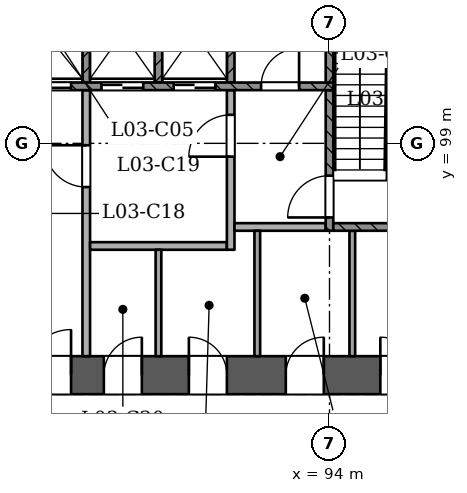
"""IFC4 building model, lengths in metres.
Left out: names, types, materials, properties, quantities, classifications, styles, units other than length and angle.
Written with IfcOpenShell. Run it as: python <this file> out.ifc"""

import sys

from ifc_helpers import new_model, si_unit, direction, frame, frame_2d, origin, place, context, subcontext, project, spatial, rectangle, extrude, element, fill, save


model = new_model("IFC4")
c1 = context("Model", 3, precision=1e-05, world=origin(), true_north=direction((0.0, 1.0)))
c2 = subcontext(c1, "Body", "Model", "MODEL_VIEW")
j1 = project(units=[si_unit("LENGTHUNIT", "METRE"), si_unit("PLANEANGLEUNIT", "RADIAN")], contexts=[c1])
p1 = place(None, origin())
s1 = spatial("IfcSite", under=j1, at=p1, CompositionType="ELEMENT")
p2 = place(p1, origin())
s2 = spatial("IfcBuilding", under=s1, at=p2, CompositionType="ELEMENT")
p3 = place(p2, frame((0.0, 0.0, 18.0)))
s3 = spatial("IfcBuildingStorey", under=s2, at=p3, CompositionType="ELEMENT", Elevation=18.0)
p4 = place(p3, frame((72.5, 92.9, 0.0), z_axis=(0.0, 0.0, 1.0), x_axis=(1.0, 0.0, 0.0)))
e1 = element("IfcWall", 1, at=p4, inside=s3, PredefinedType="SHEAR", context=c2, shape_type="SweptSolid", body=[
    extrude(rectangle(XDim=25.5, YDim=1.0, at=frame_2d((12.75, 0.0))), origin(), (0.0, 0.0, 1.0), 4.5),
])
p5 = place(p4, frame((1.3, 0.0, 0.0)))
e2 = element("IfcOpeningElement", 2, at=p5, cuts=e1, PredefinedType="OPENING", context=c2, shape_type="SweptSolid", body=[
    extrude(rectangle(XDim=1.2, YDim=2.1, at=frame_2d((0.6, 1.05))), frame((0.0, 0.51, 0.0), z_axis=(0.0, -1.0, 0.0), x_axis=(1.0, 0.0, 0.0)), (0.0, 0.0, 1.0), 1.021),
])
p6 = place(p4, frame((3.5, 0.0, 0.0)))
e3 = element("IfcOpeningElement", 3, at=p6, cuts=e1, PredefinedType="OPENING", context=c2, shape_type="SweptSolid", body=[
    extrude(rectangle(XDim=1.2, YDim=2.1, at=frame_2d((0.6, 1.05))), frame((0.0, 0.51, 0.0), z_axis=(0.0, -1.0, 0.0), x_axis=(1.0, 0.0, 0.0)), (0.0, 0.0, 1.0), 1.021),
])
p7 = place(p4, frame((13.5, 0.0, 0.0)))
e4 = element("IfcOpeningElement", 4, at=p7, cuts=e1, PredefinedType="OPENING", context=c2, shape_type="SweptSolid", body=[
    extrude(rectangle(XDim=1.2, YDim=2.1, at=frame_2d((0.6, 1.05))), frame((0.0, 0.51, 0.0), z_axis=(0.0, -1.0, 0.0), x_axis=(1.0, 0.0, 0.0)), (0.0, 0.0, 1.0), 1.021),
])
p8 = place(p4, frame((15.562, 0.0, 0.0)))
e5 = element("IfcOpeningElement", 5, at=p8, cuts=e1, PredefinedType="OPENING", context=c2, shape_type="SweptSolid", body=[
    extrude(rectangle(XDim=1.0, YDim=2.1, at=frame_2d((0.5, 1.05))), frame((0.0, 0.51, 0.0), z_axis=(0.0, -1.0, 0.0), x_axis=(1.0, 0.0, 0.0)), (0.0, 0.0, 1.0), 1.021),
])
p9 = place(p4, frame((17.8, 0.0, 0.0)))
e6 = element("IfcOpeningElement", 6, at=p9, cuts=e1, PredefinedType="OPENING", context=c2, shape_type="SweptSolid", body=[
    extrude(rectangle(XDim=1.0, YDim=2.1, at=frame_2d((0.5, 1.05))), frame((0.0, 0.51, 0.0), z_axis=(0.0, -1.0, 0.0), x_axis=(1.0, 0.0, 0.0)), (0.0, 0.0, 1.0), 1.021),
])
p10 = place(p4, frame((20.35, 0.0, 0.0)))
e7 = element("IfcOpeningElement", 7, at=p10, cuts=e1, PredefinedType="OPENING", context=c2, shape_type="SweptSolid", body=[
    extrude(rectangle(XDim=1.0, YDim=2.1, at=frame_2d((0.5, 1.05))), frame((0.0, 0.51, 0.0), z_axis=(0.0, -1.0, 0.0), x_axis=(1.0, 0.0, 0.0)), (0.0, 0.0, 1.0), 1.021),
])
p11 = place(p4, frame((22.837, 0.0, 0.0)))
e8 = element("IfcOpeningElement", 8, at=p11, cuts=e1, PredefinedType="OPENING", context=c2, shape_type="SweptSolid", body=[
    extrude(rectangle(XDim=1.0, YDim=2.1, at=frame_2d((0.5, 1.05))), frame((0.0, 0.51, 0.0), z_axis=(0.0, -1.0, 0.0), x_axis=(1.0, 0.0, 0.0)), (0.0, 0.0, 1.0), 1.021),
])
p12 = place(p3, frame((86.747, 47.526, 0.0), z_axis=(0.0, 0.0, 1.0), x_axis=(0.500000085768, 0.866025354266, 0.0)))
e9 = element("IfcWall", 9, at=p12, inside=s3, PredefinedType="PARTITIONING", context=c2, shape_type="SweptSolid", body=[
    extrude(rectangle(XDim=55.365, YDim=0.15, at=frame_2d((27.682, 0.0))), origin(), (0.0, 0.0, 1.0), 3.55),
])
p13 = place(p12, frame((0.97, 0.0, 0.0)))
e10 = element("IfcOpeningElement", 10, at=p13, cuts=e9, PredefinedType="OPENING", context=c2, shape_type="SweptSolid", body=[
    extrude(rectangle(XDim=1.2, YDim=2.1, at=frame_2d((0.6, 1.05))), frame((0.0, 0.085, 0.0), z_axis=(0.0, -1.0, 0.0), x_axis=(1.0, 0.0, 0.0)), (0.0, 0.0, 1.0), 0.171),
])
p14 = place(p12, frame((11.332, 0.0, 0.0)))
e11 = element("IfcOpeningElement", 11, at=p14, cuts=e9, PredefinedType="OPENING", context=c2, shape_type="SweptSolid", body=[
    extrude(rectangle(XDim=1.2, YDim=2.1, at=frame_2d((0.6, 1.05))), frame((0.0, 0.085, 0.0), z_axis=(0.0, -1.0, 0.0), x_axis=(1.0, 0.0, 0.0)), (0.0, 0.0, 1.0), 0.171),
])
p15 = place(p12, frame((22.582, 0.0, 0.0)))
e12 = element("IfcOpeningElement", 12, at=p15, cuts=e9, PredefinedType="OPENING", context=c2, shape_type="SweptSolid", body=[
    extrude(rectangle(XDim=1.2, YDim=2.1, at=frame_2d((0.6, 1.05))), frame((0.0, 0.085, 0.0), z_axis=(0.0, -1.0, 0.0), x_axis=(1.0, 0.0, 0.0)), (0.0, 0.0, 1.0), 0.171),
])
p16 = place(p12, frame((28.365, 0.0, 0.0)))
e13 = element("IfcOpeningElement", 13, at=p16, cuts=e9, PredefinedType="OPENING", context=c2, shape_type="SweptSolid", body=[
    extrude(rectangle(XDim=1.0, YDim=2.1, at=frame_2d((0.5, 1.05))), frame((0.0, 0.085, 0.0), z_axis=(0.0, -1.0, 0.0), x_axis=(1.0, 0.0, 0.0)), (0.0, 0.0, 1.0), 0.171),
])
p17 = place(p12, frame((30.615, 0.0, 0.0)))
e14 = element("IfcOpeningElement", 14, at=p17, cuts=e9, PredefinedType="OPENING", context=c2, shape_type="SweptSolid", body=[
    extrude(rectangle(XDim=1.0, YDim=2.1, at=frame_2d((0.5, 1.05))), frame((0.0, 0.085, 0.0), z_axis=(0.0, -1.0, 0.0), x_axis=(1.0, 0.0, 0.0)), (0.0, 0.0, 1.0), 0.171),
])
p18 = place(p12, frame((38.332, 0.0, 0.0)))
e15 = element("IfcOpeningElement", 15, at=p18, cuts=e9, PredefinedType="OPENING", context=c2, shape_type="SweptSolid", body=[
    extrude(rectangle(XDim=1.2, YDim=2.1, at=frame_2d((0.6, 1.05))), frame((0.0, 0.085, 0.0), z_axis=(0.0, -1.0, 0.0), x_axis=(1.0, 0.0, 0.0)), (0.0, 0.0, 1.0), 0.171),
])
p19 = place(p12, frame((49.582, 0.0, 0.0)))
e16 = element("IfcOpeningElement", 16, at=p19, cuts=e9, PredefinedType="OPENING", context=c2, shape_type="SweptSolid", body=[
    extrude(rectangle(XDim=1.2, YDim=2.1, at=frame_2d((0.6, 1.05))), frame((0.0, 0.085, 0.0), z_axis=(0.0, -1.0, 0.0), x_axis=(1.0, 0.0, 0.0)), (0.0, 0.0, 1.0), 0.171),
])
p20 = place(p3, frame((121.762, 95.574, 0.0), z_axis=(0.0, 0.0, 1.0), x_axis=(-0.499997306052, -0.866026959131, 0.0)))
e17 = element("IfcWall", 17, at=p20, inside=s3, PredefinedType="SOLIDWALL", context=c2, shape_type="SweptSolid", body=[
    extrude(rectangle(XDim=62.87, YDim=0.4, at=frame_2d((31.435, 0.0))), origin(), (0.0, 0.0, 1.0), 3.55),
])
p21 = place(p20, frame((59.452, 0.0, 0.9)))
e18 = element("IfcOpeningElement", 18, at=p21, cuts=e17, PredefinedType="OPENING", context=c2, shape_type="SweptSolid", body=[
    extrude(rectangle(XDim=2.4, YDim=1.5, at=frame_2d((1.2, 0.75))), frame((0.0, 0.21, 0.0), z_axis=(0.0, -1.0, 0.0), x_axis=(1.0, 0.0, 0.0)), (0.0, 0.0, 1.0), 0.421),
])
p22 = place(p20, frame((54.986, 0.0, 0.9)))
e19 = element("IfcOpeningElement", 19, at=p22, cuts=e17, PredefinedType="OPENING", context=c2, shape_type="SweptSolid", body=[
    extrude(rectangle(XDim=2.4, YDim=1.5, at=frame_2d((1.2, 0.75))), frame((0.0, 0.21, 0.0), z_axis=(0.0, -1.0, 0.0), x_axis=(1.0, 0.0, 0.0)), (0.0, 0.0, 1.0), 0.421),
])
p23 = place(p20, frame((50.486, 0.0, 0.9)))
e20 = element("IfcOpeningElement", 20, at=p23, cuts=e17, PredefinedType="OPENING", context=c2, shape_type="SweptSolid", body=[
    extrude(rectangle(XDim=2.4, YDim=1.5, at=frame_2d((1.2, 0.75))), frame((0.0, 0.21, 0.0), z_axis=(0.0, -1.0, 0.0), x_axis=(1.0, 0.0, 0.0)), (0.0, 0.0, 1.0), 0.421),
])
p24 = place(p20, frame((45.986, 0.0, 0.9)))
e21 = element("IfcOpeningElement", 21, at=p24, cuts=e17, PredefinedType="OPENING", context=c2, shape_type="SweptSolid", body=[
    extrude(rectangle(XDim=2.4, YDim=1.5, at=frame_2d((1.2, 0.75))), frame((0.0, 0.21, 0.0), z_axis=(0.0, -1.0, 0.0), x_axis=(1.0, 0.0, 0.0)), (0.0, 0.0, 1.0), 0.421),
])
p25 = place(p20, frame((41.486, 0.0, 0.9)))
e22 = element("IfcOpeningElement", 22, at=p25, cuts=e17, PredefinedType="OPENING", context=c2, shape_type="SweptSolid", body=[
    extrude(rectangle(XDim=2.4, YDim=1.5, at=frame_2d((1.2, 0.75))), frame((0.0, 0.21, 0.0), z_axis=(0.0, -1.0, 0.0), x_axis=(1.0, 0.0, 0.0)), (0.0, 0.0, 1.0), 0.421),
])
p26 = place(p20, frame((36.986, 0.0, 0.9)))
e23 = element("IfcOpeningElement", 23, at=p26, cuts=e17, PredefinedType="OPENING", context=c2, shape_type="SweptSolid", body=[
    extrude(rectangle(XDim=2.4, YDim=1.5, at=frame_2d((1.2, 0.75))), frame((0.0, 0.21, 0.0), z_axis=(0.0, -1.0, 0.0), x_axis=(1.0, 0.0, 0.0)), (0.0, 0.0, 1.0), 0.421),
])
p27 = place(p20, frame((23.486, 0.0, 0.9)))
e24 = element("IfcOpeningElement", 24, at=p27, cuts=e17, PredefinedType="OPENING", context=c2, shape_type="SweptSolid", body=[
    extrude(rectangle(XDim=2.4, YDim=1.5, at=frame_2d((1.2, 0.75))), frame((0.0, 0.21, 0.0), z_axis=(0.0, -1.0, 0.0), x_axis=(1.0, 0.0, 0.0)), (0.0, 0.0, 1.0), 0.421),
])
p28 = place(p20, frame((18.986, 0.0, 0.9)))
e25 = element("IfcOpeningElement", 25, at=p28, cuts=e17, PredefinedType="OPENING", context=c2, shape_type="SweptSolid", body=[
    extrude(rectangle(XDim=2.4, YDim=1.5, at=frame_2d((1.2, 0.75))), frame((0.0, 0.21, 0.0), z_axis=(0.0, -1.0, 0.0), x_axis=(1.0, 0.0, 0.0)), (0.0, 0.0, 1.0), 0.421),
])
p29 = place(p20, frame((14.486, 0.0, 0.9)))
e26 = element("IfcOpeningElement", 26, at=p29, cuts=e17, PredefinedType="OPENING", context=c2, shape_type="SweptSolid", body=[
    extrude(rectangle(XDim=2.4, YDim=1.5, at=frame_2d((1.2, 0.75))), frame((0.0, 0.21, 0.0), z_axis=(0.0, -1.0, 0.0), x_axis=(1.0, 0.0, 0.0)), (0.0, 0.0, 1.0), 0.421),
])
p30 = place(p20, frame((5.486, 0.0, 0.9)))
e27 = element("IfcOpeningElement", 27, at=p30, cuts=e17, PredefinedType="OPENING", context=c2, shape_type="SweptSolid", body=[
    extrude(rectangle(XDim=2.4, YDim=1.5, at=frame_2d((1.2, 0.75))), frame((0.0, 0.21, 0.0), z_axis=(0.0, -1.0, 0.0), x_axis=(1.0, 0.0, 0.0)), (0.0, 0.0, 1.0), 0.421),
])
p31 = place(p20, frame((1.018, 0.0, 0.9)))
e28 = element("IfcOpeningElement", 28, at=p31, cuts=e17, PredefinedType="OPENING", context=c2, shape_type="SweptSolid", body=[
    extrude(rectangle(XDim=2.4, YDim=1.5, at=frame_2d((1.2, 0.75))), frame((0.0, 0.21, 0.0), z_axis=(0.0, -1.0, 0.0), x_axis=(1.0, 0.0, 0.0)), (0.0, 0.0, 1.0), 0.421),
])
p32 = place(p3, frame((87.6, 93.4, 0.0), z_axis=(0.0, 0.0, 1.0), x_axis=(0.0, 1.0, 0.0)))
e29 = element("IfcWall", 29, at=p32, inside=s3, PredefinedType="PARTITIONING", context=c2, shape_type="SweptSolid", body=[
    extrude(rectangle(XDim=7.0, YDim=0.2, at=frame_2d((3.5, 0.0))), origin(), (0.0, 0.0, 1.0), 4.05),
])
p33 = place(p32, frame((4.45, 0.0, 0.0)))
e30 = element("IfcOpeningElement", 30, at=p33, cuts=e29, PredefinedType="OPENING", context=c2, shape_type="SweptSolid", body=[
    extrude(rectangle(XDim=1.1, YDim=2.1, at=frame_2d((0.55, 1.05))), frame((0.0, 0.11, 0.0), z_axis=(0.0, -1.0, 0.0), x_axis=(1.0, 0.0, 0.0)), (0.0, 0.0, 1.0), 0.221),
])
p34 = place(p3, frame((89.5, 93.4, 0.0), z_axis=(0.0, 0.0, 1.0), x_axis=(0.0, 1.0, 0.0)))
e31 = element("IfcWall", 31, at=p34, inside=s3, PredefinedType="PARTITIONING", context=c2, shape_type="SweptSolid", body=[
    extrude(rectangle(XDim=2.8, YDim=0.15, at=frame_2d((1.4, 0.0))), origin(), (0.0, 0.0, 1.0), 4.05),
])
for number, where, z_axis, x_axis in (
    (32, (92.1, 93.4, 0.0), (0.0, 0.0, 1.0), (0.0, 1.0, 0.0)),
    (33, (94.6, 93.4, 0.0), (0.0, 0.0, 1.0), (0.0, 1.0, 0.0)),
):
    element("IfcWall", number, at=place(p3, frame(where, z_axis=z_axis, x_axis=x_axis)), inside=s3, PredefinedType="PARTITIONING", context=c2, shape_type="SweptSolid", body=[
        extrude(rectangle(XDim=3.3, YDim=0.15, at=frame_2d((1.65, 0.0))), origin(), (0.0, 0.0, 1.0), 4.05),
    ])
p35 = place(p3, frame((87.7, 96.3, 0.0), z_axis=(0.0, 0.0, 1.0), x_axis=(1.0, 0.0, 0.0)))
e34 = element("IfcWall", 34, at=p35, inside=s3, PredefinedType="PARTITIONING", context=c2, shape_type="SweptSolid", body=[
    extrude(rectangle(XDim=3.6, YDim=0.2, at=frame_2d((1.8, 0.0))), origin(), (0.0, 0.0, 1.0), 4.05),
])
p36 = place(p3, frame((91.4, 96.2, 0.0), z_axis=(0.0, 0.0, 1.0), x_axis=(0.0, 1.0, 0.0)))
e35 = element("IfcWall", 35, at=p36, inside=s3, PredefinedType="PARTITIONING", context=c2, shape_type="SweptSolid", body=[
    extrude(rectangle(XDim=4.2, YDim=0.2, at=frame_2d((2.1, 0.0))), origin(), (0.0, 0.0, 1.0), 4.05),
])
p37 = place(p36, frame((2.45, 0.0, 0.0)))
e36 = element("IfcOpeningElement", 36, at=p37, cuts=e35, PredefinedType="OPENING", context=c2, shape_type="SweptSolid", body=[
    extrude(rectangle(XDim=1.1, YDim=2.1, at=frame_2d((0.55, 1.05))), frame((0.0, 0.11, 0.0), z_axis=(0.0, -1.0, 0.0), x_axis=(1.0, 0.0, 0.0)), (0.0, 0.0, 1.0), 0.221),
])
p38 = place(p3, frame((91.5, 96.8, 0.0), z_axis=(0.0, 0.0, 1.0), x_axis=(1.0, 0.0, 0.0)))
e37 = element("IfcWall", 37, at=p38, inside=s3, PredefinedType="PARTITIONING", context=c2, shape_type="SweptSolid", body=[
    extrude(rectangle(XDim=2.4, YDim=0.2, at=frame_2d((1.2, 0.0))), origin(), (0.0, 0.0, 1.0), 4.05),
])
p39 = place(p3, frame((94.0, 96.7, 0.0), z_axis=(0.0, 0.0, 1.0), x_axis=(0.0, 1.0, 0.0)))
e38 = element("IfcWall", 38, at=p39, inside=s3, PredefinedType="SOLIDWALL", context=c2, shape_type="SweptSolid", body=[
    extrude(rectangle(XDim=3.7, YDim=0.2, at=frame_2d((1.85, 0.0))), origin(), (0.0, 0.0, 1.0), 4.05),
])
p40 = place(p39, frame((0.35, 0.0, 0.0)))
e39 = element("IfcOpeningElement", 39, at=p40, cuts=e38, PredefinedType="OPENING", context=c2, shape_type="SweptSolid", body=[
    extrude(rectangle(XDim=1.1, YDim=2.1, at=frame_2d((0.55, 1.05))), frame((0.0, 0.11, 0.0), z_axis=(0.0, -1.0, 0.0), x_axis=(1.0, 0.0, 0.0)), (0.0, 0.0, 1.0), 0.221),
])
p41 = place(p3, frame((94.1, 96.8, 0.0), z_axis=(0.0, 0.0, 1.0), x_axis=(1.0, 0.0, 0.0)))
e40 = element("IfcWall", 40, at=p41, inside=s3, PredefinedType="SOLIDWALL", context=c2, shape_type="SweptSolid", body=[
    extrude(rectangle(XDim=2.9, YDim=0.2, at=frame_2d((1.45, 0.0))), origin(), (0.0, 0.0, 1.0), 4.05),
])
p42 = place(p3, frame((75.9, 100.5, 0.0), z_axis=(0.0, 0.0, 1.0), x_axis=(1.0, 0.0, 0.0)))
e41 = element("IfcWall", 41, at=p42, inside=s3, PredefinedType="SOLIDWALL", context=c2, shape_type="SweptSolid", body=[
    extrude(rectangle(XDim=18.2, YDim=0.2, at=frame_2d((9.1, 0.0))), origin(), (0.0, 0.0, 1.0), 4.05),
])
p43 = place(p42, frame((2.6, 0.0, 0.0)))
e42 = element("IfcOpeningElement", 42, at=p43, cuts=e41, PredefinedType="OPENING", context=c2, shape_type="SweptSolid", body=[
    extrude(rectangle(XDim=1.1, YDim=2.1, at=frame_2d((0.55, 1.05))), frame((0.0, 0.11, 0.0), z_axis=(0.0, -1.0, 0.0), x_axis=(1.0, 0.0, 0.0)), (0.0, 0.0, 1.0), 0.221),
])
p44 = place(p42, frame((4.5, 0.0, 0.0)))
e43 = element("IfcOpeningElement", 43, at=p44, cuts=e41, PredefinedType="OPENING", context=c2, shape_type="SweptSolid", body=[
    extrude(rectangle(XDim=1.1, YDim=2.1, at=frame_2d((0.55, 1.05))), frame((0.0, 0.11, 0.0), z_axis=(0.0, -1.0, 0.0), x_axis=(1.0, 0.0, 0.0)), (0.0, 0.0, 1.0), 0.221),
])
p45 = place(p42, frame((6.4, 0.0, 0.0)))
e44 = element("IfcOpeningElement", 44, at=p45, cuts=e41, PredefinedType="OPENING", context=c2, shape_type="SweptSolid", body=[
    extrude(rectangle(XDim=1.1, YDim=2.1, at=frame_2d((0.55, 1.05))), frame((0.0, 0.11, 0.0), z_axis=(0.0, -1.0, 0.0), x_axis=(1.0, 0.0, 0.0)), (0.0, 0.0, 1.0), 0.221),
])
p46 = place(p42, frame((8.3, 0.0, 0.0)))
e45 = element("IfcOpeningElement", 45, at=p46, cuts=e41, PredefinedType="OPENING", context=c2, shape_type="SweptSolid", body=[
    extrude(rectangle(XDim=1.1, YDim=2.1, at=frame_2d((0.55, 1.05))), frame((0.0, 0.11, 0.0), z_axis=(0.0, -1.0, 0.0), x_axis=(1.0, 0.0, 0.0)), (0.0, 0.0, 1.0), 0.221),
])
p47 = place(p42, frame((10.2, 0.0, 0.0)))
e46 = element("IfcOpeningElement", 46, at=p47, cuts=e41, PredefinedType="OPENING", context=c2, shape_type="SweptSolid", body=[
    extrude(rectangle(XDim=1.1, YDim=2.1, at=frame_2d((0.55, 1.05))), frame((0.0, 0.11, 0.0), z_axis=(0.0, -1.0, 0.0), x_axis=(1.0, 0.0, 0.0)), (0.0, 0.0, 1.0), 0.221),
])
p48 = place(p42, frame((12.1, 0.0, 0.0)))
e47 = element("IfcOpeningElement", 47, at=p48, cuts=e41, PredefinedType="OPENING", context=c2, shape_type="SweptSolid", body=[
    extrude(rectangle(XDim=1.1, YDim=2.1, at=frame_2d((0.55, 1.05))), frame((0.0, 0.11, 0.0), z_axis=(0.0, -1.0, 0.0), x_axis=(1.0, 0.0, 0.0)), (0.0, 0.0, 1.0), 0.221),
])
p49 = place(p42, frame((14.0, 0.0, 0.0)))
e48 = element("IfcOpeningElement", 48, at=p49, cuts=e41, PredefinedType="OPENING", context=c2, shape_type="SweptSolid", body=[
    extrude(rectangle(XDim=1.1, YDim=2.1, at=frame_2d((0.55, 1.05))), frame((0.0, 0.11, 0.0), z_axis=(0.0, -1.0, 0.0), x_axis=(1.0, 0.0, 0.0)), (0.0, 0.0, 1.0), 0.221),
])
p50 = place(p42, frame((0.65, 0.0, 0.0)))
e49 = element("IfcOpeningElement", 49, at=p50, cuts=e41, PredefinedType="OPENING", context=c2, shape_type="SweptSolid", body=[
    extrude(rectangle(XDim=1.0, YDim=2.1, at=frame_2d((0.5, 1.05))), frame((0.0, 0.11, 0.0), z_axis=(0.0, -1.0, 0.0), x_axis=(1.0, 0.0, 0.0)), (0.0, 0.0, 1.0), 0.221),
])
p51 = place(p42, frame((16.3, 0.0, 0.0)))
e50 = element("IfcOpeningElement", 50, at=p51, cuts=e41, PredefinedType="OPENING", context=c2, shape_type="SweptSolid", body=[
    extrude(rectangle(XDim=1.0, YDim=2.1, at=frame_2d((0.5, 1.05))), frame((0.0, 0.11, 0.0), z_axis=(0.0, -1.0, 0.0), x_axis=(1.0, 0.0, 0.0)), (0.0, 0.0, 1.0), 0.221),
])
for number, where, z_axis, x_axis in (
    (51, (87.6, 100.6, 0.0), (0.0, 0.0, 1.0), (0.0, 1.0, 0.0)),
    (52, (89.5, 100.6, 0.0), (0.0, 0.0, 1.0), (0.0, 1.0, 0.0)),
    (53, (91.4, 100.6, 0.0), (0.0, 0.0, 1.0), (0.0, 1.0, 0.0)),
    (54, (94.0, 100.6, 0.0), (0.0, 0.0, 1.0), (0.0, 1.0, 0.0)),
):
    element("IfcWall", number, at=place(p3, frame(where, z_axis=z_axis, x_axis=x_axis)), inside=s3, PredefinedType="SOLIDWALL", context=c2, shape_type="SweptSolid", body=[
        extrude(rectangle(XDim=2.8, YDim=0.2, at=frame_2d((1.4, 0.0))), origin(), (0.0, 0.0, 1.0), 4.05),
    ])
p52 = place(p47, origin())
e55 = element("IfcDoor", 55, at=p52, inside=s3, OperationType="SLIDING_TO_RIGHT", PredefinedType="NOTDEFINED", context=c2, shape_type="SweptSolid", body=[
    extrude(rectangle(XDim=1.1, YDim=2.1, at=frame_2d((0.55, 1.05))), frame((0.0, 0.025, 0.0), z_axis=(0.0, -1.0, 0.0), x_axis=(1.0, 0.0, 0.0)), (0.0, 0.0, 1.0), 0.05),
])
fill(e46, e55)
p53 = place(p48, origin())
e56 = element("IfcDoor", 56, at=p53, inside=s3, OperationType="SLIDING_TO_RIGHT", PredefinedType="NOTDEFINED", context=c2, shape_type="SweptSolid", body=[
    extrude(rectangle(XDim=1.1, YDim=2.1, at=frame_2d((0.55, 1.05))), frame((0.0, 0.025, 0.0), z_axis=(0.0, -1.0, 0.0), x_axis=(1.0, 0.0, 0.0)), (0.0, 0.0, 1.0), 0.05),
])
fill(e47, e56)
p54 = place(p49, origin())
e57 = element("IfcDoor", 57, at=p54, inside=s3, OperationType="SLIDING_TO_LEFT", PredefinedType="NOTDEFINED", context=c2, shape_type="SweptSolid", body=[
    extrude(rectangle(XDim=1.1, YDim=2.1, at=frame_2d((0.55, 1.05))), frame((0.0, 0.025, 0.0), z_axis=(0.0, -1.0, 0.0), x_axis=(1.0, 0.0, 0.0)), (0.0, 0.0, 1.0), 0.05),
])
fill(e48, e57)
p55 = place(p40, origin())
e58 = element("IfcDoor", 58, at=p55, inside=s3, OperationType="SINGLE_SWING_LEFT", PredefinedType="NOTDEFINED", context=c2, shape_type="SweptSolid", body=[
    extrude(rectangle(XDim=1.1, YDim=2.1, at=frame_2d((0.55, 1.05))), frame((0.0, 0.025, 0.0), z_axis=(0.0, -1.0, 0.0), x_axis=(1.0, 0.0, 0.0)), (0.0, 0.0, 1.0), 0.05),
])
fill(e39, e58)
p56 = place(p33, origin())
e59 = element("IfcDoor", 59, at=p56, inside=s3, OperationType="SINGLE_SWING_RIGHT", PredefinedType="NOTDEFINED", context=c2, shape_type="SweptSolid", body=[
    extrude(rectangle(XDim=1.1, YDim=2.1, at=frame_2d((0.55, 1.05))), frame((0.0, 0.025, 0.0), z_axis=(0.0, -1.0, 0.0), x_axis=(1.0, 0.0, 0.0)), (0.0, 0.0, 1.0), 0.05),
])
fill(e30, e59)
p57 = place(p37, origin())
e60 = element("IfcDoor", 60, at=p57, inside=s3, OperationType="SINGLE_SWING_LEFT", PredefinedType="NOTDEFINED", context=c2, shape_type="SweptSolid", body=[
    extrude(rectangle(XDim=1.1, YDim=2.1, at=frame_2d((0.55, 1.05))), frame((0.0, 0.025, 0.0), z_axis=(0.0, -1.0, 0.0), x_axis=(1.0, 0.0, 0.0)), (0.0, 0.0, 1.0), 0.05),
])
fill(e36, e60)
p58 = place(p7, origin())
e61 = element("IfcDoor", 61, at=p58, inside=s3, OperationType="SINGLE_SWING_RIGHT", PredefinedType="NOTDEFINED", context=c2, shape_type="SweptSolid", body=[
    extrude(rectangle(XDim=1.2, YDim=2.1, at=frame_2d((0.6, 1.05))), frame((0.0, 0.025, 0.0), z_axis=(0.0, -1.0, 0.0), x_axis=(1.0, 0.0, 0.0)), (0.0, 0.0, 1.0), 0.05),
])
fill(e4, e61)
p59 = place(p51, origin())
e62 = element("IfcDoor", 62, at=p59, inside=s3, OperationType="SINGLE_SWING_RIGHT", PredefinedType="NOTDEFINED", context=c2, shape_type="SweptSolid", body=[
    extrude(rectangle(XDim=1.0, YDim=2.1, at=frame_2d((0.5, 1.05))), frame((0.0, 0.025, 0.0), z_axis=(0.0, -1.0, 0.0), x_axis=(1.0, 0.0, 0.0)), (0.0, 0.0, 1.0), 0.05),
])
fill(e50, e62)
p60 = place(p8, origin())
e63 = element("IfcDoor", 63, at=p60, inside=s3, OperationType="SINGLE_SWING_RIGHT", PredefinedType="NOTDEFINED", context=c2, shape_type="SweptSolid", body=[
    extrude(rectangle(XDim=1.0, YDim=2.1, at=frame_2d((0.5, 1.05))), frame((0.0, 0.025, 0.0), z_axis=(0.0, -1.0, 0.0), x_axis=(1.0, 0.0, 0.0)), (0.0, 0.0, 1.0), 0.05),
])
fill(e5, e63)
p61 = place(p9, origin())
e64 = element("IfcDoor", 64, at=p61, inside=s3, OperationType="SINGLE_SWING_LEFT", PredefinedType="NOTDEFINED", context=c2, shape_type="SweptSolid", body=[
    extrude(rectangle(XDim=1.0, YDim=2.1, at=frame_2d((0.5, 1.05))), frame((0.0, 0.025, 0.0), z_axis=(0.0, -1.0, 0.0), x_axis=(1.0, 0.0, 0.0)), (0.0, 0.0, 1.0), 0.05),
])
fill(e6, e64)
p62 = place(p10, origin())
e65 = element("IfcDoor", 65, at=p62, inside=s3, OperationType="SINGLE_SWING_RIGHT", PredefinedType="NOTDEFINED", context=c2, shape_type="SweptSolid", body=[
    extrude(rectangle(XDim=1.0, YDim=2.1, at=frame_2d((0.5, 1.05))), frame((0.0, 0.025, 0.0), z_axis=(0.0, -1.0, 0.0), x_axis=(1.0, 0.0, 0.0)), (0.0, 0.0, 1.0), 0.05),
])
fill(e7, e65)
p63 = place(p11, origin())
e66 = element("IfcDoor", 66, at=p63, inside=s3, OperationType="SINGLE_SWING_LEFT", PredefinedType="NOTDEFINED", context=c2, shape_type="SweptSolid", body=[
    extrude(rectangle(XDim=1.0, YDim=2.1, at=frame_2d((0.5, 1.05))), frame((0.0, 0.025, 0.0), z_axis=(0.0, -1.0, 0.0), x_axis=(1.0, 0.0, 0.0)), (0.0, 0.0, 1.0), 0.05),
])
fill(e8, e66)
save(model, sys.argv[1])
